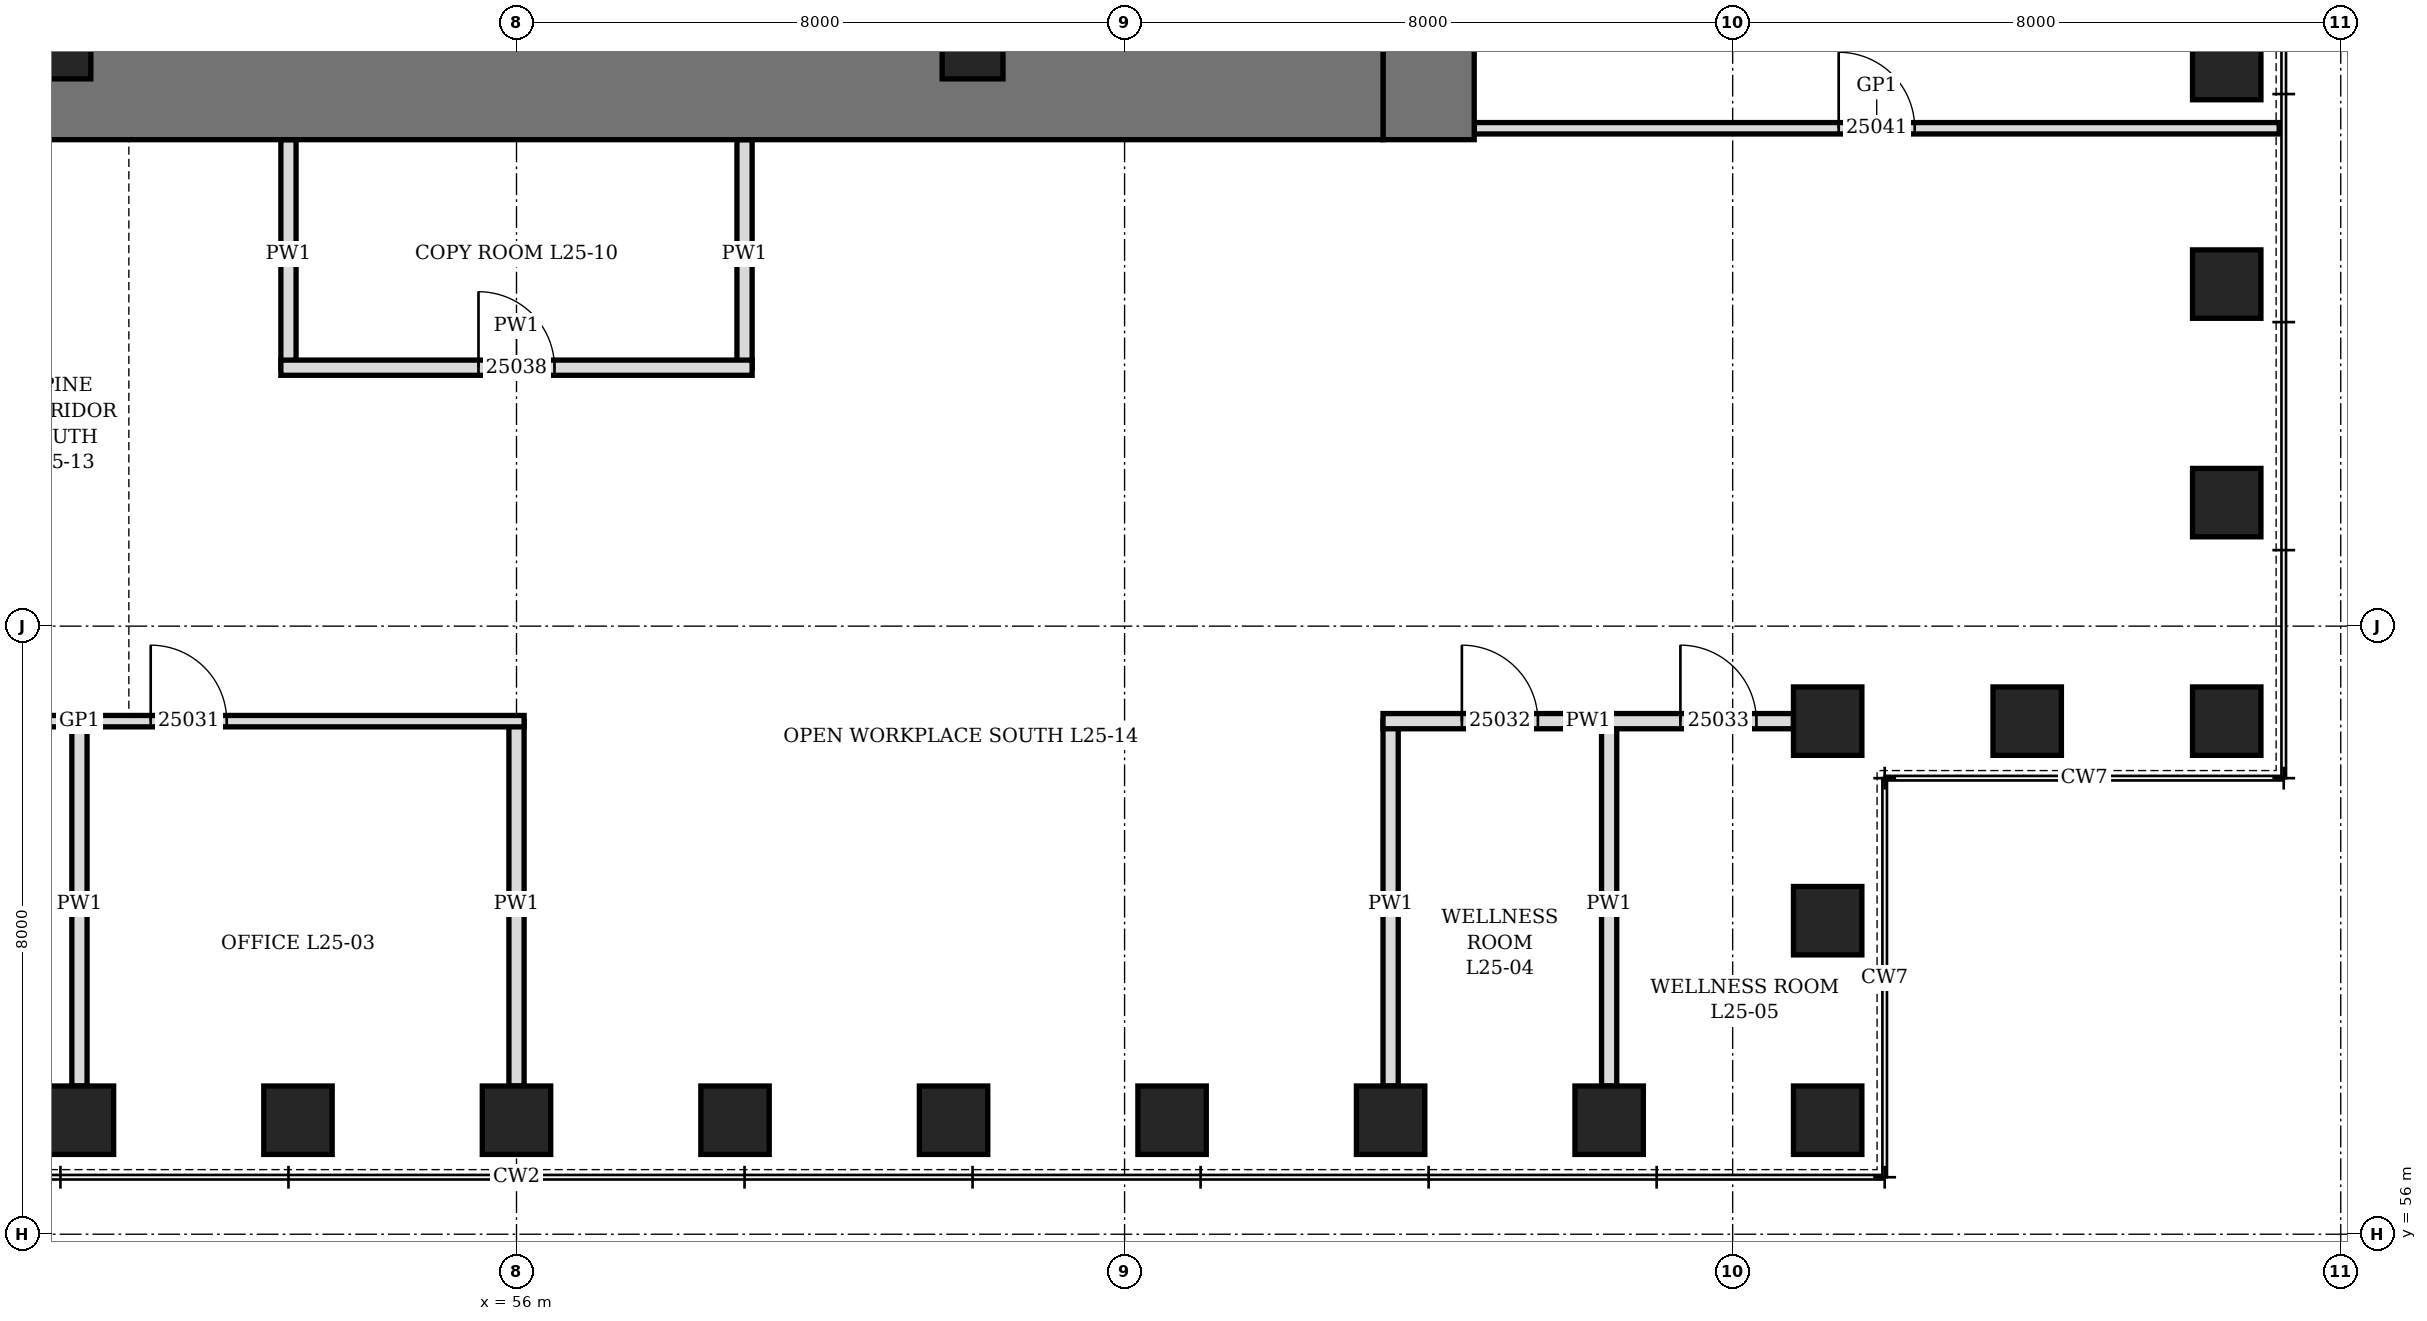
"""IFC4 building model, lengths in metres.
Left out: names, types, materials, properties, quantities, classifications, styles, units other than length and angle.
Written with IfcOpenShell. Run it as: python <this file> out.ifc"""

import sys

from ifc_helpers import new_model, si_unit, direction, frame, frame_2d, origin, origin_2d, place, context, subcontext, project, spatial, rectangle, hollow_rectangle, extrude, element, fill, save


model = new_model("IFC4")
c1 = context("Model", 3, precision=1e-05, world=origin(), true_north=direction((0.0, 1.0)))
c2 = subcontext(c1, "Body", "Model", "MODEL_VIEW")
j1 = project(units=[si_unit("LENGTHUNIT", "METRE"), si_unit("PLANEANGLEUNIT", "RADIAN")], contexts=[c1])
p1 = place(None, origin())
s1 = spatial("IfcSite", under=j1, at=p1, CompositionType="ELEMENT")
p2 = place(p1, origin())
s2 = spatial("IfcBuilding", under=s1, at=p2, CompositionType="ELEMENT")
p3 = place(p2, frame((0.0, 0.0, 116.5)))
s3 = spatial("IfcBuildingStorey", under=s2, at=p3, CompositionType="ELEMENT", Elevation=116.5)
for number, where, z_axis, x_axis in (
    (1, (50.25, 57.5, 0.0), (0.0, 0.0, 1.0), (1.0, 0.0, 0.0)),
    (2, (53.125, 57.5, 0.0), (0.0, 0.0, 1.0), (1.0, 0.0, 0.0)),
    (3, (56.0, 57.5, 0.0), (0.0, 0.0, 1.0), (1.0, 0.0, 0.0)),
    (4, (58.875, 57.5, 0.0), (0.0, 0.0, 1.0), (1.0, 0.0, 0.0)),
    (5, (61.75, 57.5, 0.0), (0.0, 0.0, 1.0), (1.0, 0.0, 0.0)),
    (6, (64.625, 57.5, 0.0), (0.0, 0.0, 1.0), (1.0, 0.0, 0.0)),
    (7, (67.5, 57.5, 0.0), (0.0, 0.0, 1.0), (1.0, 0.0, 0.0)),
    (8, (70.375, 57.5, 0.0), (0.0, 0.0, 1.0), (1.0, 0.0, 0.0)),
    (9, (73.25, 57.5, 0.0), (0.0, 0.0, 1.0), (0.0, 1.0, 0.0)),
    (10, (73.25, 60.125, 0.0), (0.0, 0.0, 1.0), (0.0, 1.0, 0.0)),
    (11, (73.25, 62.75, 0.0), (0.0, 0.0, 1.0), (1.0, 0.0, 0.0)),
    (12, (75.875, 62.75, 0.0), (0.0, 0.0, 1.0), (1.0, 0.0, 0.0)),
    (13, (78.5, 62.75, 0.0), (0.0, 0.0, 1.0), (0.0, 1.0, 0.0)),
    (14, (78.5, 65.625, 0.0), (0.0, 0.0, 1.0), (0.0, 1.0, 0.0)),
    (15, (78.5, 68.5, 0.0), (0.0, 0.0, 1.0), (0.0, 1.0, 0.0)),
    (16, (78.5, 71.375, 0.0), (0.0, 0.0, 1.0), (0.0, 1.0, 0.0)),
):
    element("IfcColumn", number, at=place(p3, frame(where, z_axis=z_axis, x_axis=x_axis)), inside=s3, PredefinedType="COLUMN", context=c2, shape_type="SweptSolid", body=[
        extrude(hollow_rectangle(XDim=0.9, YDim=0.9, WallThickness=0.15, at=origin_2d()), origin(), (0.0, 0.0, 1.0), 4.2),
    ])
p4 = place(p3, frame((68.0, 70.4, 0.0), z_axis=(0.0, 0.0, 1.0), x_axis=(0.0, 1.0, 0.0)))
e17 = element("IfcWall", 17, at=p4, inside=s3, PredefinedType="SHEAR", context=c2, shape_type="SweptSolid", body=[
    extrude(rectangle(XDim=19.2, YDim=1.2, at=frame_2d((9.6, 0.0))), origin(), (0.0, 0.0, 1.0), 4.2),
])
p5 = place(p4, frame((8.6, 0.0, 0.0)))
e18 = element("IfcOpeningElement", 18, at=p5, cuts=e17, PredefinedType="OPENING", context=c2, shape_type="SweptSolid", body=[
    extrude(rectangle(XDim=2.0, YDim=2.4, at=frame_2d((1.0, 1.2))), frame((0.0, 0.61, 0.0), z_axis=(0.0, -1.0, 0.0), x_axis=(1.0, 0.0, 0.0)), (0.0, 0.0, 1.0), 1.22),
])
p6 = place(p3, frame((44.6, 71.0, 0.0), z_axis=(0.0, 0.0, 1.0), x_axis=(1.0, 0.0, 0.0)))
e19 = element("IfcWall", 19, at=p6, inside=s3, PredefinedType="SHEAR", context=c2, shape_type="SweptSolid", body=[
    extrude(rectangle(XDim=22.8, YDim=1.2, at=frame_2d((11.4, 0.0))), origin(), (0.0, 0.0, 1.0), 4.2),
])
for number, where, z_axis, x_axis in (
    (20, (50.0, 71.6, 0.0), (0.0, 0.0, 1.0), (1.0, 0.0, 0.0)),
    (21, (62.0, 71.6, 0.0), (0.0, 0.0, 1.0), (1.0, 0.0, 0.0)),
):
    element("IfcColumn", number, at=place(p3, frame(where, z_axis=z_axis, x_axis=x_axis)), inside=s3, PredefinedType="COLUMN", context=c2, shape_type="SweptSolid", body=[
        extrude(hollow_rectangle(XDim=0.8, YDim=0.8, WallThickness=0.1, at=origin_2d()), origin(), (0.0, 0.0, 1.0), 4.2),
    ])
for number, where, z_axis, x_axis in (
    (22, (50.25, 57.95, 0.0), (0.0, 0.0, 1.0), (0.0, 1.0, 0.0)),
    (23, (56.0, 57.95, 0.0), (0.0, 0.0, 1.0), (0.0, 1.0, 0.0)),
):
    element("IfcWall", number, at=place(p3, frame(where, z_axis=z_axis, x_axis=x_axis)), inside=s3, PredefinedType="PARTITIONING", context=c2, shape_type="SweptSolid", body=[
        extrude(rectangle(XDim=4.8, YDim=0.2, at=frame_2d((2.4, 0.0))), origin(), (0.0, 0.0, 1.0), 3.278),
    ])
p7 = place(p3, frame((67.5, 57.95, 0.0), z_axis=(0.0, 0.0, 1.0), x_axis=(0.0, 1.0, 0.0)))
e24 = element("IfcWall", 24, at=p7, inside=s3, PredefinedType="PARTITIONING", context=c2, shape_type="SweptSolid", body=[
    extrude(rectangle(XDim=4.8, YDim=0.2, at=frame_2d((2.4, 0.0))), origin(), (0.0, 0.0, 1.0), 2.74),
])
p8 = place(p3, frame((70.375, 57.95, 0.0), z_axis=(0.0, 0.0, 1.0), x_axis=(0.0, 1.0, 0.0)))
e25 = element("IfcWall", 25, at=p8, inside=s3, PredefinedType="PARTITIONING", context=c2, shape_type="SweptSolid", body=[
    extrude(rectangle(XDim=4.8, YDim=0.2, at=frame_2d((2.4, 0.0))), origin(), (0.0, 0.0, 1.0), 3.428),
])
for number, where, z_axis, x_axis in (
    (26, (53.0, 67.4, 0.0), (0.0, 0.0, 1.0), (0.0, 1.0, 0.0)),
    (27, (59.0, 67.4, 0.0), (0.0, 0.0, 1.0), (0.0, 1.0, 0.0)),
):
    element("IfcWall", number, at=place(p3, frame(where, z_axis=z_axis, x_axis=x_axis)), inside=s3, PredefinedType="PARTITIONING", context=c2, shape_type="SweptSolid", body=[
        extrude(rectangle(XDim=3.0, YDim=0.2, at=frame_2d((1.5, 0.0))), origin(), (0.0, 0.0, 1.0), 3.278),
    ])
p9 = place(p3, frame((44.4, 62.75, 0.0), z_axis=(0.0, 0.0, 1.0), x_axis=(1.0, 0.0, 0.0)))
e28 = element("IfcWall", 28, at=p9, inside=s3, PredefinedType="PARTITIONING", context=c2, shape_type="SweptSolid", body=[
    extrude(rectangle(XDim=11.7, YDim=0.15, at=frame_2d((5.85, 0.0))), origin(), (0.0, 0.0, 1.0), 4.04),
])
p10 = place(p9, frame((1.038, 0.0, 0.0)))
e29 = element("IfcOpeningElement", 29, at=p10, cuts=e28, PredefinedType="OPENING", context=c2, shape_type="SweptSolid", body=[
    extrude(rectangle(XDim=1.0, YDim=2.1, at=frame_2d((0.5, 1.05))), frame((0.0, 0.085, 0.0), z_axis=(0.0, -1.0, 0.0), x_axis=(1.0, 0.0, 0.0)), (0.0, 0.0, 1.0), 0.17),
])
p11 = place(p9, frame((6.788, 0.0, 0.0)))
e30 = element("IfcOpeningElement", 30, at=p11, cuts=e28, PredefinedType="OPENING", context=c2, shape_type="SweptSolid", body=[
    extrude(rectangle(XDim=1.0, YDim=2.1, at=frame_2d((0.5, 1.05))), frame((0.0, 0.085, 0.0), z_axis=(0.0, -1.0, 0.0), x_axis=(1.0, 0.0, 0.0)), (0.0, 0.0, 1.0), 0.17),
])
p12 = place(p3, frame((67.4, 62.75, 0.0), z_axis=(0.0, 0.0, 1.0), x_axis=(1.0, 0.0, 0.0)))
e31 = element("IfcWall", 31, at=p12, inside=s3, PredefinedType="PARTITIONING", context=c2, shape_type="SweptSolid", body=[
    extrude(rectangle(XDim=5.4, YDim=0.2, at=frame_2d((2.7, 0.0))), origin(), (0.0, 0.0, 1.0), 4.04),
])
p13 = place(p12, frame((1.038, 0.0, 0.0)))
e32 = element("IfcOpeningElement", 32, at=p13, cuts=e31, PredefinedType="OPENING", context=c2, shape_type="SweptSolid", body=[
    extrude(rectangle(XDim=1.0, YDim=2.1, at=frame_2d((0.5, 1.05))), frame((0.0, 0.11, 0.0), z_axis=(0.0, -1.0, 0.0), x_axis=(1.0, 0.0, 0.0)), (0.0, 0.0, 1.0), 0.22),
])
p14 = place(p12, frame((3.913, 0.0, 0.0)))
e33 = element("IfcOpeningElement", 33, at=p14, cuts=e31, PredefinedType="OPENING", context=c2, shape_type="SweptSolid", body=[
    extrude(rectangle(XDim=1.0, YDim=2.1, at=frame_2d((0.5, 1.05))), frame((0.0, 0.11, 0.0), z_axis=(0.0, -1.0, 0.0), x_axis=(1.0, 0.0, 0.0)), (0.0, 0.0, 1.0), 0.22),
])
p15 = place(p3, frame((52.9, 67.4, 0.0), z_axis=(0.0, 0.0, 1.0), x_axis=(1.0, 0.0, 0.0)))
e34 = element("IfcWall", 34, at=p15, inside=s3, PredefinedType="PARTITIONING", context=c2, shape_type="SweptSolid", body=[
    extrude(rectangle(XDim=6.2, YDim=0.2, at=frame_2d((3.1, 0.0))), origin(), (0.0, 0.0, 1.0), 4.04),
])
p16 = place(p15, frame((2.6, 0.0, 0.0)))
e35 = element("IfcOpeningElement", 35, at=p16, cuts=e34, PredefinedType="OPENING", context=c2, shape_type="SweptSolid", body=[
    extrude(rectangle(XDim=1.0, YDim=2.1, at=frame_2d((0.5, 1.05))), frame((0.0, 0.11, 0.0), z_axis=(0.0, -1.0, 0.0), x_axis=(1.0, 0.0, 0.0)), (0.0, 0.0, 1.0), 0.22),
])
p17 = place(p3, frame((68.6, 70.55, 0.0), z_axis=(0.0, 0.0, 1.0), x_axis=(1.0, 0.0, 0.0)))
e36 = element("IfcWall", 36, at=p17, inside=s3, PredefinedType="PARTITIONING", context=c2, shape_type="SweptSolid", body=[
    extrude(rectangle(XDim=10.59, YDim=0.15, at=frame_2d((5.295, 0.0))), origin(), (0.0, 0.0, 1.0), 4.04),
])
p18 = place(p17, frame((4.795, 0.0, 0.0)))
e37 = element("IfcOpeningElement", 37, at=p18, cuts=e36, PredefinedType="OPENING", context=c2, shape_type="SweptSolid", body=[
    extrude(rectangle(XDim=1.0, YDim=2.4, at=frame_2d((0.5, 1.2))), frame((0.0, 0.085, 0.0), z_axis=(0.0, -1.0, 0.0), x_axis=(1.0, 0.0, 0.0)), (0.0, 0.0, 1.0), 0.17),
])
p19 = place(p11, origin())
e38 = element("IfcDoor", 38, at=p19, inside=s3, OperationType="SINGLE_SWING_LEFT", PredefinedType="DOOR", context=c2, shape_type="SweptSolid", body=[
    extrude(rectangle(XDim=1.0, YDim=2.1, at=frame_2d((0.5, 1.05))), frame((0.0, 0.075, 0.0), z_axis=(0.0, -1.0, 0.0), x_axis=(1.0, 0.0, 0.0)), (0.0, 0.0, 1.0), 0.149),
])
fill(e30, e38)
p20 = place(p13, origin())
e39 = element("IfcDoor", 39, at=p20, inside=s3, OperationType="SINGLE_SWING_LEFT", PredefinedType="DOOR", context=c2, shape_type="SweptSolid", body=[
    extrude(rectangle(XDim=1.0, YDim=2.1, at=frame_2d((0.5, 1.05))), frame((0.0, 0.1, 0.0), z_axis=(0.0, -1.0, 0.0), x_axis=(1.0, 0.0, 0.0)), (0.0, 0.0, 1.0), 0.199),
])
fill(e32, e39)
p21 = place(p14, origin())
e40 = element("IfcDoor", 40, at=p21, inside=s3, OperationType="SINGLE_SWING_LEFT", PredefinedType="DOOR", context=c2, shape_type="SweptSolid", body=[
    extrude(rectangle(XDim=1.0, YDim=2.1, at=frame_2d((0.5, 1.05))), frame((0.0, 0.1, 0.0), z_axis=(0.0, -1.0, 0.0), x_axis=(1.0, 0.0, 0.0)), (0.0, 0.0, 1.0), 0.199),
])
fill(e33, e40)
p22 = place(p16, origin())
e41 = element("IfcDoor", 41, at=p22, inside=s3, OperationType="SINGLE_SWING_LEFT", PredefinedType="DOOR", context=c2, shape_type="SweptSolid", body=[
    extrude(rectangle(XDim=1.0, YDim=2.1, at=frame_2d((0.5, 1.05))), frame((0.0, 0.1, 0.0), z_axis=(0.0, -1.0, 0.0), x_axis=(1.0, 0.0, 0.0)), (0.0, 0.0, 1.0), 0.199),
])
fill(e35, e41)
p23 = place(p18, origin())
e42 = element("IfcDoor", 42, at=p23, inside=s3, OperationType="SINGLE_SWING_RIGHT", PredefinedType="DOOR", context=c2, shape_type="SweptSolid", body=[
    extrude(rectangle(XDim=1.0, YDim=2.4, at=frame_2d((0.5, 1.2))), frame((0.0, 0.075, 0.0), z_axis=(0.0, -1.0, 0.0), x_axis=(1.0, 0.0, 0.0)), (0.0, 0.0, 1.0), 0.149),
])
fill(e37, e42)
save(model, sys.argv[1])
